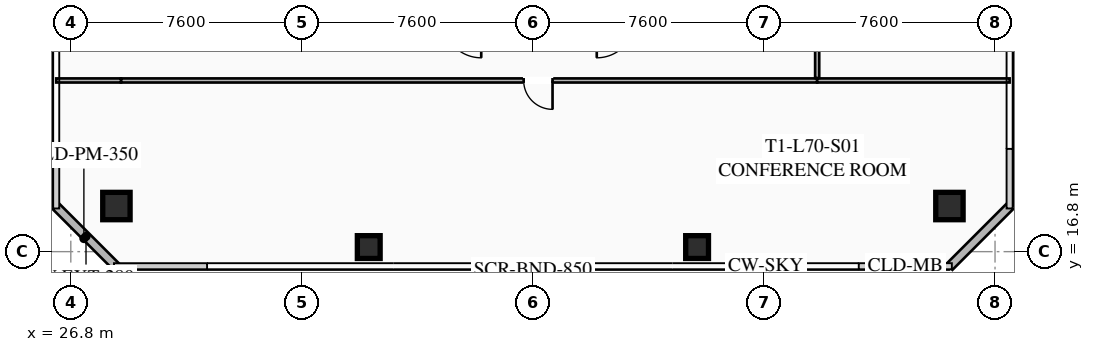
"""IFC4 building model, lengths in metres.
Left out: names, types, materials, properties, quantities, classifications, styles, units other than length and angle.
Written with IfcOpenShell. Run it as: python <this file> out.ifc"""

import sys

from ifc_helpers import new_model, si_unit, direction, frame, frame_2d, origin, origin_2d, place, context, subcontext, project, spatial, rectangle, hollow_rectangle, extrude, element, fill, save


model = new_model("IFC4")
c1 = context("Model", 3, precision=1e-05, world=origin(), true_north=direction((0.0, 1.0)))
c2 = subcontext(c1, "Body", "Model", "MODEL_VIEW")
j1 = project(units=[si_unit("LENGTHUNIT", "METRE"), si_unit("PLANEANGLEUNIT", "RADIAN")], contexts=[c1])
p1 = place(None, origin())
s1 = spatial("IfcSite", under=j1, at=p1, CompositionType="ELEMENT")
p2 = place(p1, origin())
s2 = spatial("IfcBuilding", under=s1, at=p2, CompositionType="ELEMENT")
p3 = place(p2, frame((0.0, 0.0, 259.4)))
s3 = spatial("IfcBuildingStorey", under=s2, at=p3, CompositionType="ELEMENT", Elevation=259.4)
for number, where, z_axis, x_axis in (
    (1, (28.3, 18.3, 0.0), (0.0, 0.0, 1.0), (1.0, 0.0, 0.0)),
    (2, (55.7, 18.3, 0.0), (0.0, 0.0, 1.0), (1.0, 0.0, 0.0)),
):
    element("IfcColumn", number, at=place(p3, frame(where, z_axis=z_axis, x_axis=x_axis)), inside=s3, PredefinedType="COLUMN", context=c2, shape_type="SweptSolid", body=[
        extrude(hollow_rectangle(XDim=0.9, YDim=0.9, WallThickness=0.04, at=origin_2d()), origin(), (0.0, 0.0, 1.0), 3.7),
    ])
for number, where, z_axis, x_axis in (
    (3, (36.6, 16.95, 0.0), (0.0, 0.0, 1.0), (1.0, 0.0, 0.0)),
    (4, (47.4, 16.95, 0.0), (0.0, 0.0, 1.0), (1.0, 0.0, 0.0)),
):
    element("IfcColumn", number, at=place(p3, frame(where, z_axis=z_axis, x_axis=x_axis)), inside=s3, PredefinedType="COLUMN", context=c2, shape_type="SweptSolid", body=[
        extrude(hollow_rectangle(XDim=0.75, YDim=0.75, WallThickness=0.032, at=origin_2d()), origin(), (0.0, 0.0, 1.0), 3.7),
    ])
for number, where, z_axis, x_axis in (
    (5, (28.3, 16.3, 0.0), (0.0, 0.0, 1.0), (-0.707, 0.707, 0.0)),
    (6, (57.7, 18.3, 0.0), (0.0, 0.0, 1.0), (-0.707, -0.707, 0.0)),
):
    element("IfcWall", number, at=place(p3, frame(where, z_axis=z_axis, x_axis=x_axis)), inside=s3, PredefinedType="SOLIDWALL", context=c2, shape_type="SweptSolid", body=[
        extrude(rectangle(XDim=2.828, YDim=0.28, at=frame_2d((1.414, 0.0))), origin(), (0.0, 0.0, 1.0), 3.7),
    ])
p4 = place(p3, frame((51.35, 22.43, 0.0), z_axis=(0.0, 0.0, 1.0), x_axis=(-1.0, 0.0, 0.0)))
e7 = element("IfcWall", 7, at=p4, inside=s3, PredefinedType="PARTITIONING", context=c2, shape_type="SweptSolid", body=[
    extrude(rectangle(XDim=22.9, YDim=0.135, at=frame_2d((11.45, 0.0))), origin(), (0.0, 0.0, 1.0), 2.659),
])
p5 = place(p4, frame((8.705, 0.0, 0.0)))
e8 = element("IfcOpeningElement", 8, at=p5, cuts=e7, PredefinedType="OPENING", context=c2, shape_type="SweptSolid", body=[
    extrude(rectangle(XDim=0.95, YDim=2.05, at=frame_2d((0.475, 1.025))), frame((0.0, 0.077, 0.0), z_axis=(0.0, -1.0, 0.0), x_axis=(1.0, 0.0, 0.0)), (0.0, 0.0, 1.0), 0.155),
])
p6 = place(p3, frame((26.32, 22.43, 0.0), z_axis=(0.0, 0.0, 1.0), x_axis=(1.0, 0.0, 0.0)))
e9 = element("IfcWall", 9, at=p6, inside=s3, PredefinedType="PARTITIONING", context=c2, shape_type="SweptSolid", body=[
    extrude(rectangle(XDim=2.13, YDim=0.135, at=frame_2d((1.065, 0.0))), origin(), (0.0, 0.0, 1.0), 2.659),
])
p7 = place(p3, frame((51.35, 22.43, 0.0), z_axis=(0.0, 0.0, 1.0), x_axis=(1.0, 0.0, 0.0)))
e10 = element("IfcWall", 10, at=p7, inside=s3, PredefinedType="PARTITIONING", context=c2, shape_type="SweptSolid", body=[
    extrude(rectangle(XDim=6.33, YDim=0.135, at=frame_2d((3.165, 0.0))), origin(), (0.0, 0.0, 1.0), 2.659),
])
p8 = place(p3, frame((51.35, 29.72, 0.0), z_axis=(0.0, 0.0, 1.0), x_axis=(0.0, -1.0, 0.0)))
e11 = element("IfcWall", 11, at=p8, inside=s3, PredefinedType="PARTITIONING", context=c2, shape_type="SweptSolid", body=[
    extrude(rectangle(XDim=7.21, YDim=0.135, at=frame_2d((3.605, 0.0))), origin(), (0.0, 0.0, 1.0), 2.659),
])
p9 = place(p8, frame((1.8, 0.0, 0.0)))
e12 = element("IfcOpeningElement", 12, at=p9, cuts=e11, PredefinedType="OPENING", context=c2, shape_type="SweptSolid", body=[
    extrude(rectangle(XDim=0.95, YDim=2.05, at=frame_2d((0.475, 1.025))), frame((0.0, 0.077, 0.0), z_axis=(0.0, -1.0, 0.0), x_axis=(1.0, 0.0, 0.0)), (0.0, 0.0, 1.0), 0.155),
])
p10 = place(p5, origin())
e13 = element("IfcDoor", 13, at=p10, inside=s3, OperationType="SINGLE_SWING_LEFT", PredefinedType="DOOR", context=c2, shape_type="SweptSolid", body=[
    extrude(rectangle(XDim=0.95, YDim=2.05, at=frame_2d((0.475, 1.025))), frame((0.0, 0.025, 0.0), z_axis=(0.0, -1.0, 0.0), x_axis=(1.0, 0.0, 0.0)), (0.0, 0.0, 1.0), 0.05),
])
fill(e8, e13)
save(model, sys.argv[1])
